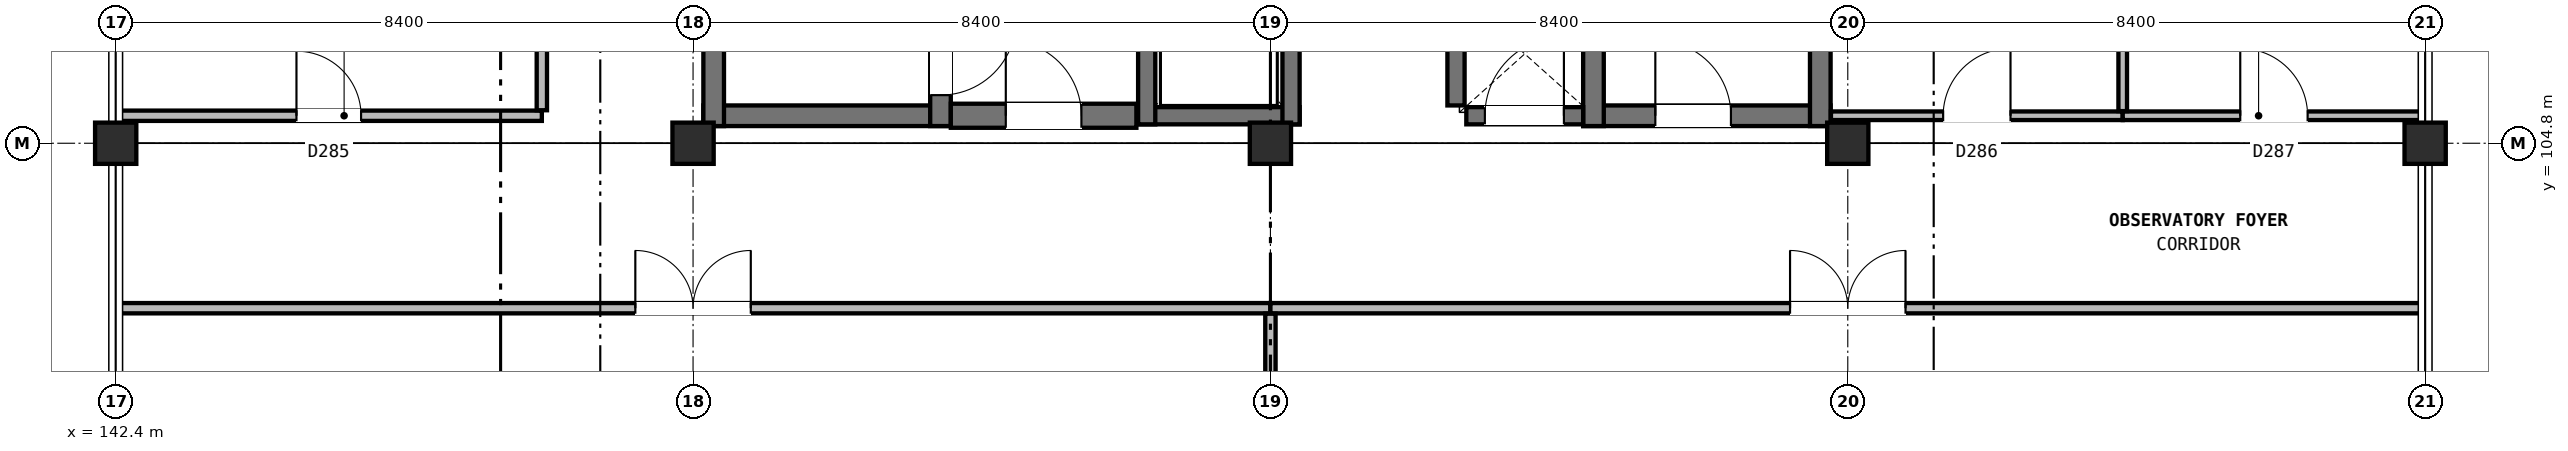
"""IFC4 building model, lengths in metres.
Left out: names, types, materials, properties, quantities, classifications, styles, units other than length and angle.
Written with IfcOpenShell. Run it as: python <this file> out.ifc"""

import sys

from ifc_helpers import new_model, si_unit, direction, frame, frame_2d, origin, origin_2d, place, context, subcontext, project, spatial, rectangle, extrude, element, fill, save


model = new_model("IFC4")
c1 = context("Model", 3, precision=1e-05, world=origin(), true_north=direction((0.0, 1.0)))
c2 = subcontext(c1, "Body", "Model", "MODEL_VIEW")
j1 = project(units=[si_unit("LENGTHUNIT", "METRE"), si_unit("PLANEANGLEUNIT", "RADIAN")], contexts=[c1])
p1 = place(None, origin())
s1 = spatial("IfcSite", under=j1, at=p1, CompositionType="ELEMENT")
p2 = place(p1, origin())
s2 = spatial("IfcBuilding", under=s1, at=p2, CompositionType="ELEMENT")
p3 = place(p2, frame((0.0, 0.0, 63.8)))
s3 = spatial("IfcBuildingStorey", under=s2, at=p3, CompositionType="ELEMENT", Elevation=63.8)
for number, where, z_axis, x_axis in (
    (1, (142.4, 104.8, 0.0), (0.0, 0.0, 1.0), (1.0, 0.0, 0.0)),
    (2, (150.8, 104.8, 0.0), (0.0, 0.0, 1.0), (1.0, 0.0, 0.0)),
    (3, (159.2, 104.8, 0.0), (0.0, 0.0, 1.0), (1.0, 0.0, 0.0)),
    (4, (167.6, 104.8, 0.0), (0.0, 0.0, 1.0), (1.0, 0.0, 0.0)),
    (5, (176.0, 104.8, 0.0), (0.0, 0.0, 1.0), (1.0, 0.0, 0.0)),
):
    element("IfcColumn", number, at=place(p3, frame(where, z_axis=z_axis, x_axis=x_axis)), inside=s3, PredefinedType="COLUMN", context=c2, shape_type="SweptSolid", body=[
        extrude(rectangle(XDim=0.6, YDim=0.6, at=origin_2d()), origin(), (0.0, 0.0, 1.0), 4.2),
    ])
p4 = place(p3, frame((150.95, 105.2, 0.0), z_axis=(0.0, 0.0, 1.0), x_axis=(1.0, 0.0, 0.0)))
e6 = element("IfcWall", 6, at=p4, inside=s3, PredefinedType="SHEAR", context=c2, shape_type="SweptSolid", body=[
    extrude(rectangle(XDim=3.6, YDim=0.3, at=frame_2d((1.8, 0.0))), origin(), (0.0, 0.0, 1.0), 4.2),
])
p5 = place(p3, frame((151.1, 105.05, 0.0), z_axis=(0.0, 0.0, 1.0), x_axis=(0.0, 1.0, 0.0)))
e7 = element("IfcWall", 7, at=p5, inside=s3, PredefinedType="SHEAR", context=c2, shape_type="SweptSolid", body=[
    extrude(rectangle(XDim=8.3, YDim=0.3, at=frame_2d((4.15, 0.0))), origin(), (0.0, 0.0, 1.0), 4.2),
])
p6 = place(p3, frame((154.4, 105.05, 0.0), z_axis=(0.0, 0.0, 1.0), x_axis=(0.0, 1.0, 0.0)))
e8 = element("IfcWall", 8, at=p6, inside=s3, PredefinedType="SHEAR", context=c2, shape_type="SweptSolid", body=[
    extrude(rectangle(XDim=8.3, YDim=0.3, at=frame_2d((4.15, 0.0))), origin(), (0.0, 0.0, 1.0), 4.2),
])
p7 = place(p6, frame((0.45, 0.0, 0.0)))
e9 = element("IfcOpeningElement", 9, at=p7, cuts=e8, PredefinedType="OPENING", context=c2, shape_type="SweptSolid", body=[
    extrude(rectangle(XDim=1.1, YDim=2.2, at=frame_2d((0.55, 1.1))), frame((0.0, 0.16, 0.0), z_axis=(0.0, -1.0, 0.0), x_axis=(1.0, 0.0, 0.0)), (0.0, 0.0, 1.0), 0.32),
])
p8 = place(p3, frame((163.75, 105.2, 0.0), z_axis=(0.0, 0.0, 1.0), x_axis=(1.0, 0.0, 0.0)))
e10 = element("IfcWall", 10, at=p8, inside=s3, PredefinedType="SHEAR", context=c2, shape_type="SweptSolid", body=[
    extrude(rectangle(XDim=3.6, YDim=0.3, at=frame_2d((1.8, 0.0))), origin(), (0.0, 0.0, 1.0), 4.2),
])
p9 = place(p8, frame((1.05, 0.0, 0.0)))
e11 = element("IfcOpeningElement", 11, at=p9, cuts=e10, PredefinedType="OPENING", context=c2, shape_type="SweptSolid", body=[
    extrude(rectangle(XDim=1.1, YDim=2.2, at=frame_2d((0.55, 1.1))), frame((0.0, 0.16, 0.0), z_axis=(0.0, -1.0, 0.0), x_axis=(1.0, 0.0, 0.0)), (0.0, 0.0, 1.0), 0.32),
])
for number, where, z_axis, x_axis in (
    (12, (163.9, 105.05, 0.0), (0.0, 0.0, 1.0), (0.0, 1.0, 0.0)),
    (13, (167.2, 105.05, 0.0), (0.0, 0.0, 1.0), (0.0, 1.0, 0.0)),
):
    element("IfcWall", number, at=place(p3, frame(where, z_axis=z_axis, x_axis=x_axis)), inside=s3, PredefinedType="SHEAR", context=c2, shape_type="SweptSolid", body=[
        extrude(rectangle(XDim=8.3, YDim=0.3, at=frame_2d((4.15, 0.0))), origin(), (0.0, 0.0, 1.0), 4.2),
    ])
p10 = place(p3, frame((157.275, 105.2, 0.0), z_axis=(0.0, 0.0, 1.0), x_axis=(1.0, 0.0, 0.0)))
e14 = element("IfcWall", 14, at=p10, inside=s3, PredefinedType="SOLIDWALL", context=c2, shape_type="SweptSolid", body=[
    extrude(rectangle(XDim=2.35, YDim=0.25, at=frame_2d((1.175, 0.0))), origin(), (0.0, 0.0, 1.0), 3.88),
])
for number, where, z_axis, x_axis in (
    (15, (157.4, 105.075, 0.0), (0.0, 0.0, 1.0), (0.0, 1.0, 0.0)),
    (16, (159.5, 105.075, 0.0), (0.0, 0.0, 1.0), (0.0, 1.0, 0.0)),
):
    element("IfcWall", number, at=place(p3, frame(where, z_axis=z_axis, x_axis=x_axis)), inside=s3, PredefinedType="SOLIDWALL", context=c2, shape_type="SweptSolid", body=[
        extrude(rectangle(XDim=2.65, YDim=0.25, at=frame_2d((1.325, 0.0))), origin(), (0.0, 0.0, 1.0), 3.88),
    ])
p11 = place(p3, frame((154.55, 105.2, 0.0), z_axis=(0.0, 0.0, 1.0), x_axis=(1.0, 0.0, 0.0)))
e17 = element("IfcWall", 17, at=p11, inside=s3, PredefinedType="SHEAR", context=c2, shape_type="SweptSolid", body=[
    extrude(rectangle(XDim=2.7, YDim=0.35, at=frame_2d((1.35, 0.0))), origin(), (0.0, 0.0, 1.0), 3.88),
])
p12 = place(p11, frame((0.8, 0.0, 0.0)))
e18 = element("IfcOpeningElement", 18, at=p12, cuts=e17, PredefinedType="OPENING", context=c2, shape_type="SweptSolid", body=[
    extrude(rectangle(XDim=1.1, YDim=2.2, at=frame_2d((0.55, 1.1))), frame((0.0, 0.185, 0.0), z_axis=(0.0, -1.0, 0.0), x_axis=(1.0, 0.0, 0.0)), (0.0, 0.0, 1.0), 0.37),
])
p13 = place(p3, frame((161.9, 105.35, 0.0), z_axis=(0.0, 0.0, 1.0), x_axis=(0.0, 1.0, 0.0)))
e19 = element("IfcWall", 19, at=p13, inside=s3, PredefinedType="SOLIDWALL", context=c2, shape_type="SweptSolid", body=[
    extrude(rectangle(XDim=1.5, YDim=0.25, at=frame_2d((0.75, 0.0))), origin(), (0.0, 0.0, 1.0), 3.88),
])
p14 = place(p3, frame((162.05, 105.2, 0.0), z_axis=(0.0, 0.0, 1.0), x_axis=(1.0, 0.0, 0.0)))
e20 = element("IfcWall", 20, at=p14, inside=s3, PredefinedType="SOLIDWALL", context=c2, shape_type="SweptSolid", body=[
    extrude(rectangle(XDim=1.7, YDim=0.25, at=frame_2d((0.85, 0.0))), origin(), (0.0, 0.0, 1.0), 3.88),
])
p15 = place(p14, frame((0.27, 0.0, 0.0)))
e21 = element("IfcOpeningElement", 21, at=p15, cuts=e20, PredefinedType="OPENING", context=c2, shape_type="SweptSolid", body=[
    extrude(rectangle(XDim=1.15, YDim=2.2, at=frame_2d((0.575, 1.1))), frame((0.0, 0.135, 0.0), z_axis=(0.0, -1.0, 0.0), x_axis=(1.0, 0.0, 0.0)), (0.0, 0.0, 1.0), 0.27),
])
p16 = place(p3, frame((142.4, 102.4, 0.0), z_axis=(0.0, 0.0, 1.0), x_axis=(1.0, 0.0, 0.0)))
e22 = element("IfcWall", 22, at=p16, inside=s3, PredefinedType="PARTITIONING", context=c2, shape_type="SweptSolid", body=[
    extrude(rectangle(XDim=16.8, YDim=0.15, at=frame_2d((8.4, 0.0))), origin(), (0.0, 0.0, 1.0), 3.865),
])
p17 = place(p16, frame((7.56, 0.0, 0.0)))
e23 = element("IfcOpeningElement", 23, at=p17, cuts=e22, PredefinedType="OPENING", context=c2, shape_type="SweptSolid", body=[
    extrude(rectangle(XDim=1.68, YDim=2.3, at=frame_2d((0.84, 1.15))), frame((0.0, 0.085, 0.0), z_axis=(0.0, -1.0, 0.0), x_axis=(1.0, 0.0, 0.0)), (0.0, 0.0, 1.0), 0.17),
])
p18 = place(p3, frame((159.2, 102.4, 0.0), z_axis=(0.0, 0.0, 1.0), x_axis=(1.0, 0.0, 0.0)))
e24 = element("IfcWall", 24, at=p18, inside=s3, PredefinedType="PARTITIONING", context=c2, shape_type="SweptSolid", body=[
    extrude(rectangle(XDim=16.8, YDim=0.15, at=frame_2d((8.4, 0.0))), origin(), (0.0, 0.0, 1.0), 3.865),
])
p19 = place(p18, frame((7.56, 0.0, 0.0)))
e25 = element("IfcOpeningElement", 25, at=p19, cuts=e24, PredefinedType="OPENING", context=c2, shape_type="SweptSolid", body=[
    extrude(rectangle(XDim=1.68, YDim=2.3, at=frame_2d((0.84, 1.15))), frame((0.0, 0.085, 0.0), z_axis=(0.0, -1.0, 0.0), x_axis=(1.0, 0.0, 0.0)), (0.0, 0.0, 1.0), 0.17),
])
p20 = place(p3, frame((142.4, 105.2, 0.0), z_axis=(0.0, 0.0, 1.0), x_axis=(1.0, 0.0, 0.0)))
e26 = element("IfcWall", 26, at=p20, inside=s3, PredefinedType="PARTITIONING", context=c2, shape_type="SweptSolid", body=[
    extrude(rectangle(XDim=6.2, YDim=0.15, at=frame_2d((3.1, 0.0))), origin(), (0.0, 0.0, 1.0), 3.445),
])
p21 = place(p20, frame((2.63, 0.0, 0.0)))
e27 = element("IfcOpeningElement", 27, at=p21, cuts=e26, PredefinedType="OPENING", context=c2, shape_type="SweptSolid", body=[
    extrude(rectangle(XDim=0.94, YDim=2.12, at=frame_2d((0.47, 1.06))), frame((0.0, 0.085, 0.0), z_axis=(0.0, -1.0, 0.0), x_axis=(1.0, 0.0, 0.0)), (0.0, 0.0, 1.0), 0.17),
])
p22 = place(p3, frame((167.355, 105.2, 0.0), z_axis=(0.0, 0.0, 1.0), x_axis=(1.0, 0.0, 0.0)))
e28 = element("IfcWall", 28, at=p22, inside=s3, PredefinedType="PARTITIONING", context=c2, shape_type="SweptSolid", body=[
    extrude(rectangle(XDim=4.245, YDim=0.125, at=frame_2d((2.123, 0.0))), origin(), (0.0, 0.0, 1.0), 3.445),
])
p23 = place(p22, frame((1.633, 0.0, 0.0)))
e29 = element("IfcOpeningElement", 29, at=p23, cuts=e28, PredefinedType="OPENING", context=c2, shape_type="SweptSolid", body=[
    extrude(rectangle(XDim=0.98, YDim=2.1, at=frame_2d((0.49, 1.05))), frame((0.0, 0.073, 0.0), z_axis=(0.0, -1.0, 0.0), x_axis=(1.0, 0.0, 0.0)), (0.0, 0.0, 1.0), 0.145),
])
p24 = place(p3, frame((171.6, 105.2, 0.0), z_axis=(0.0, 0.0, 1.0), x_axis=(1.0, 0.0, 0.0)))
e30 = element("IfcWall", 30, at=p24, inside=s3, PredefinedType="PARTITIONING", context=c2, shape_type="SweptSolid", body=[
    extrude(rectangle(XDim=4.4, YDim=0.125, at=frame_2d((2.2, 0.0))), origin(), (0.0, 0.0, 1.0), 3.445),
])
p25 = place(p24, frame((1.71, 0.0, 0.0)))
e31 = element("IfcOpeningElement", 31, at=p25, cuts=e30, PredefinedType="OPENING", context=c2, shape_type="SweptSolid", body=[
    extrude(rectangle(XDim=0.98, YDim=2.1, at=frame_2d((0.49, 1.05))), frame((0.0, 0.073, 0.0), z_axis=(0.0, -1.0, 0.0), x_axis=(1.0, 0.0, 0.0)), (0.0, 0.0, 1.0), 0.145),
])
p26 = place(p3, frame((148.6, 105.28, 0.0), z_axis=(0.0, 0.0, 1.0), x_axis=(0.0, 1.0, 0.0)))
e32 = element("IfcWall", 32, at=p26, inside=s3, PredefinedType="PARTITIONING", context=c2, shape_type="SweptSolid", body=[
    extrude(rectangle(XDim=14.12, YDim=0.15, at=frame_2d((7.06, 0.0))), origin(), (0.0, 0.0, 1.0), 3.865),
])
p27 = place(p3, frame((159.2, 87.5, 0.0), z_axis=(0.0, 0.0, 1.0), x_axis=(0.0, 1.0, 0.0)))
e33 = element("IfcWall", 33, at=p27, inside=s3, PredefinedType="PARTITIONING", context=c2, shape_type="SweptSolid", body=[
    extrude(rectangle(XDim=14.82, YDim=0.15, at=frame_2d((7.41, 0.0))), origin(), (0.0, 0.0, 1.0), 3.445),
])
p28 = place(p3, frame((171.6, 105.268, 0.0), z_axis=(0.0, 0.0, 1.0), x_axis=(0.0, 1.0, 0.0)))
e34 = element("IfcWall", 34, at=p28, inside=s3, PredefinedType="PARTITIONING", context=c2, shape_type="SweptSolid", body=[
    extrude(rectangle(XDim=17.132, YDim=0.125, at=frame_2d((8.566, 0.0))), origin(), (0.0, 0.0, 1.0), 3.865),
])
p29 = place(p7, frame((1.1, 0.0, 0.0), z_axis=(0.0, 0.0, 1.0), x_axis=(-1.0, 0.0, 0.0)))
e35 = element("IfcDoor", 35, at=p29, inside=s3, OperationType="SINGLE_SWING_RIGHT", PredefinedType="DOOR", context=c2, shape_type="SweptSolid", body=[
    extrude(rectangle(XDim=1.1, YDim=2.2, at=frame_2d((0.55, 1.1))), frame((0.0, 0.025, 0.0), z_axis=(0.0, -1.0, 0.0), x_axis=(1.0, 0.0, 0.0)), (0.0, 0.0, 1.0), 0.05),
])
fill(e9, e35)
p30 = place(p9, origin())
e36 = element("IfcDoor", 36, at=p30, inside=s3, OperationType="SINGLE_SWING_LEFT", PredefinedType="DOOR", context=c2, shape_type="SweptSolid", body=[
    extrude(rectangle(XDim=1.1, YDim=2.2, at=frame_2d((0.55, 1.1))), frame((0.0, 0.025, 0.0), z_axis=(0.0, -1.0, 0.0), x_axis=(1.0, 0.0, 0.0)), (0.0, 0.0, 1.0), 0.05),
])
fill(e11, e36)
p31 = place(p12, origin())
e37 = element("IfcDoor", 37, at=p31, inside=s3, OperationType="SINGLE_SWING_LEFT", PredefinedType="DOOR", context=c2, shape_type="SweptSolid", body=[
    extrude(rectangle(XDim=1.1, YDim=2.2, at=frame_2d((0.55, 1.1))), frame((0.0, 0.025, 0.0), z_axis=(0.0, -1.0, 0.0), x_axis=(1.0, 0.0, 0.0)), (0.0, 0.0, 1.0), 0.05),
])
fill(e18, e37)
p32 = place(p15, origin())
e38 = element("IfcDoor", 38, at=p32, inside=s3, OperationType="SINGLE_SWING_RIGHT", PredefinedType="DOOR", context=c2, shape_type="SweptSolid", body=[
    extrude(rectangle(XDim=1.15, YDim=2.2, at=frame_2d((0.575, 1.1))), frame((0.0, 0.025, 0.0), z_axis=(0.0, -1.0, 0.0), x_axis=(1.0, 0.0, 0.0)), (0.0, 0.0, 1.0), 0.05),
])
fill(e21, e38)
p33 = place(p17, origin())
e39 = element("IfcDoor", 39, at=p33, inside=s3, OperationType="DOUBLE_DOOR_SINGLE_SWING", PredefinedType="DOOR", context=c2, shape_type="SweptSolid", body=[
    extrude(rectangle(XDim=1.68, YDim=2.3, at=frame_2d((0.84, 1.15))), frame((0.0, 0.025, 0.0), z_axis=(0.0, -1.0, 0.0), x_axis=(1.0, 0.0, 0.0)), (0.0, 0.0, 1.0), 0.05),
])
fill(e23, e39)
p34 = place(p19, origin())
e40 = element("IfcDoor", 40, at=p34, inside=s3, OperationType="DOUBLE_DOOR_SINGLE_SWING", PredefinedType="DOOR", context=c2, shape_type="SweptSolid", body=[
    extrude(rectangle(XDim=1.68, YDim=2.3, at=frame_2d((0.84, 1.15))), frame((0.0, 0.025, 0.0), z_axis=(0.0, -1.0, 0.0), x_axis=(1.0, 0.0, 0.0)), (0.0, 0.0, 1.0), 0.05),
])
fill(e25, e40)
p35 = place(p21, origin())
e41 = element("IfcDoor", 41, at=p35, inside=s3, OperationType="SINGLE_SWING_LEFT", PredefinedType="DOOR", context=c2, shape_type="SweptSolid", body=[
    extrude(rectangle(XDim=0.94, YDim=2.12, at=frame_2d((0.47, 1.06))), frame((0.0, 0.025, 0.0), z_axis=(0.0, -1.0, 0.0), x_axis=(1.0, 0.0, 0.0)), (0.0, 0.0, 1.0), 0.05),
])
fill(e27, e41)
p36 = place(p23, origin())
e42 = element("IfcDoor", 42, at=p36, inside=s3, OperationType="SINGLE_SWING_RIGHT", PredefinedType="DOOR", context=c2, shape_type="SweptSolid", body=[
    extrude(rectangle(XDim=0.98, YDim=2.1, at=frame_2d((0.49, 1.05))), frame((0.0, 0.025, 0.0), z_axis=(0.0, -1.0, 0.0), x_axis=(1.0, 0.0, 0.0)), (0.0, 0.0, 1.0), 0.05),
])
fill(e29, e42)
p37 = place(p25, origin())
e43 = element("IfcDoor", 43, at=p37, inside=s3, OperationType="SINGLE_SWING_LEFT", PredefinedType="DOOR", context=c2, shape_type="SweptSolid", body=[
    extrude(rectangle(XDim=0.98, YDim=2.1, at=frame_2d((0.49, 1.05))), frame((0.0, 0.025, 0.0), z_axis=(0.0, -1.0, 0.0), x_axis=(1.0, 0.0, 0.0)), (0.0, 0.0, 1.0), 0.05),
])
fill(e31, e43)
save(model, sys.argv[1])
